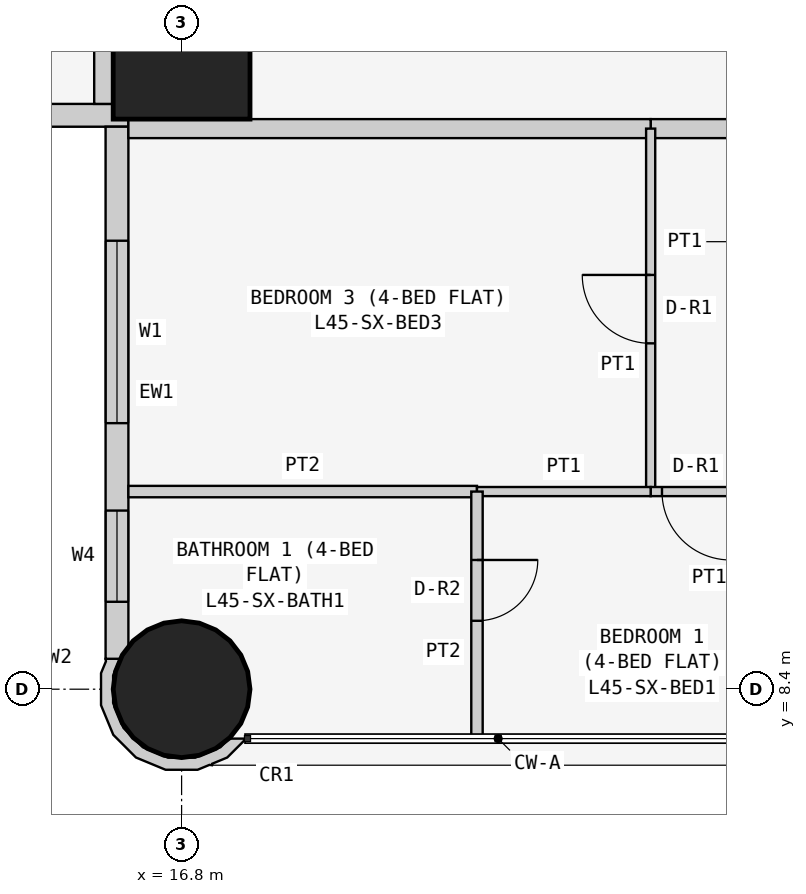
"""IFC4 building model, lengths in metres.
Left out: names, types, materials, properties, quantities, classifications, styles, units other than length and angle.
Written with IfcOpenShell. Run it as: python <this file> out.ifc"""

import sys

from ifc_helpers import new_model, si_unit, direction, frame, frame_2d, origin, origin_2d, place, context, subcontext, project, spatial, polyline, rectangle, circle, outline, extrude, element, fill, save


model = new_model("IFC4")
c1 = context("Model", 3, precision=1e-05, world=origin(), true_north=direction((0.0, 1.0)))
c2 = subcontext(c1, "Body", "Model", "MODEL_VIEW")
j1 = project(units=[si_unit("LENGTHUNIT", "METRE"), si_unit("PLANEANGLEUNIT", "RADIAN")], contexts=[c1])
p1 = place(None, origin())
s1 = spatial("IfcSite", under=j1, at=p1, CompositionType="ELEMENT")
p2 = place(p1, origin())
s2 = spatial("IfcBuilding", under=s1, at=p2, CompositionType="ELEMENT")
p3 = place(p2, frame((0.0, 0.0, 173.7)))
s3 = spatial("IfcBuildingStorey", under=s2, at=p3, CompositionType="ELEMENT", Elevation=173.7)
p4 = place(p3, frame((16.8, 8.4, 0.0), z_axis=(0.0, 0.0, 1.0), x_axis=(1.0, 0.0, 0.0)))
e1 = element("IfcColumn", 1, at=p4, inside=s3, PredefinedType="COLUMN", context=c2, shape_type="SweptSolid", body=[
    extrude(circle(Radius=0.9, at=origin_2d()), origin(), (0.0, 0.0, 1.0), 3.6),
])
p5 = place(p3, frame((16.8, 16.8, 0.0), z_axis=(0.0, 0.0, 1.0), x_axis=(1.0, 0.0, 0.0)))
e2 = element("IfcColumn", 2, at=p5, inside=s3, PredefinedType="COLUMN", context=c2, shape_type="SweptSolid", body=[
    extrude(rectangle(XDim=1.8, YDim=1.8, at=origin_2d()), origin(), (0.0, 0.0, 1.0), 3.6),
])
p6 = place(p3, frame((0.4, 15.95, 0.0), z_axis=(0.0, 0.0, 1.0), x_axis=(1.0, 0.0, 0.0)))
e3 = element("IfcWall", 3, at=p6, inside=s3, PredefinedType="SOLIDWALL", context=c2, shape_type="SweptSolid", body=[
    extrude(rectangle(XDim=15.7, YDim=0.3, at=frame_2d((7.85, 0.0))), origin(), (0.0, 0.0, 1.0), 3.35),
])
p7 = place(p6, frame((12.4, 0.0, 0.9)))
e4 = element("IfcOpeningElement", 4, at=p7, cuts=e3, PredefinedType="OPENING", context=c2, shape_type="SweptSolid", body=[
    extrude(rectangle(XDim=1.8, YDim=1.5, at=frame_2d((0.9, 0.75))), frame((0.0, 0.16, 0.0), z_axis=(0.0, -1.0, 0.0), x_axis=(1.0, 0.0, 0.0)), (0.0, 0.0, 1.0), 0.32),
])
p8 = place(p6, frame((9.55, 0.0, 1.5)))
e5 = element("IfcOpeningElement", 5, at=p8, cuts=e3, PredefinedType="OPENING", context=c2, shape_type="SweptSolid", body=[
    extrude(rectangle(XDim=0.9, YDim=0.7, at=frame_2d((0.45, 0.35))), frame((0.0, 0.16, 0.0), z_axis=(0.0, -1.0, 0.0), x_axis=(1.0, 0.0, 0.0)), (0.0, 0.0, 1.0), 0.32),
])
p9 = place(p6, frame((5.1, 0.0, 0.9)))
e6 = element("IfcOpeningElement", 6, at=p9, cuts=e3, PredefinedType="OPENING", context=c2, shape_type="SweptSolid", body=[
    extrude(rectangle(XDim=1.8, YDim=1.5, at=frame_2d((0.9, 0.75))), frame((0.0, 0.16, 0.0), z_axis=(0.0, -1.0, 0.0), x_axis=(1.0, 0.0, 0.0)), (0.0, 0.0, 1.0), 0.32),
])
p10 = place(p6, frame((2.0, 0.0, 0.0)))
e7 = element("IfcOpeningElement", 7, at=p10, cuts=e3, PredefinedType="OPENING", context=c2, shape_type="SweptSolid", body=[
    extrude(rectangle(XDim=0.9, YDim=2.4, at=frame_2d((0.45, 1.2))), frame((0.0, 0.16, 0.0), z_axis=(0.0, -1.0, 0.0), x_axis=(1.0, 0.0, 0.0)), (0.0, 0.0, 1.0), 0.32),
])
p11 = place(p6, frame((0.7, 0.0, 0.9)))
e8 = element("IfcOpeningElement", 8, at=p11, cuts=e3, PredefinedType="OPENING", context=c2, shape_type="SweptSolid", body=[
    extrude(rectangle(XDim=1.2, YDim=1.5, at=frame_2d((0.6, 0.75))), frame((0.0, 0.16, 0.0), z_axis=(0.0, -1.0, 0.0), x_axis=(1.0, 0.0, 0.0)), (0.0, 0.0, 1.0), 0.32),
])
p12 = place(p3, frame((15.95, 15.8, 0.0), z_axis=(0.0, 0.0, 1.0), x_axis=(0.0, -1.0, 0.0)))
e9 = element("IfcWall", 9, at=p12, inside=s3, PredefinedType="SOLIDWALL", context=c2, shape_type="SweptSolid", body=[
    extrude(rectangle(XDim=7.0, YDim=0.3, at=frame_2d((3.5, 0.0))), origin(), (0.0, 0.0, 1.0), 3.35),
])
p13 = place(p12, frame((1.5, 0.0, 0.9)))
e10 = element("IfcOpeningElement", 10, at=p13, cuts=e9, PredefinedType="OPENING", context=c2, shape_type="SweptSolid", body=[
    extrude(rectangle(XDim=2.4, YDim=1.5, at=frame_2d((1.2, 0.75))), frame((0.0, 0.16, 0.0), z_axis=(0.0, -1.0, 0.0), x_axis=(1.0, 0.0, 0.0)), (0.0, 0.0, 1.0), 0.32),
])
p14 = place(p12, frame((5.05, 0.0, 0.9)))
e11 = element("IfcOpeningElement", 11, at=p14, cuts=e9, PredefinedType="OPENING", context=c2, shape_type="SweptSolid", body=[
    extrude(rectangle(XDim=1.2, YDim=1.5, at=frame_2d((0.6, 0.75))), frame((0.0, 0.16, 0.0), z_axis=(0.0, -1.0, 0.0), x_axis=(1.0, 0.0, 0.0)), (0.0, 0.0, 1.0), 0.32),
])
p15 = place(p3, frame((15.89, 8.764, 0.0), z_axis=(0.0, 0.0, 1.0), x_axis=(-0.377204953059, -0.926129809145, 0.0)))
e12 = element("IfcWall", 12, at=p15, inside=s3, PredefinedType="SOLIDWALL", context=c2, shape_type="SweptSolid", body=[
    extrude(outline(polyline([(0.36, 1.803), (0.509, 1.741), (0.761, 1.486), (0.896, 1.154), (0.894, 0.795), (0.755, 0.465), (0.5, 0.213), (0.168, 0.078), (-0.1, 0.08), (0.001, -0.097), (0.03, -0.08), (0.198, -0.081), (0.589, 0.078), (0.889, 0.374), (1.052, 0.763), (1.055, 1.184), (0.896, 1.575), (0.778, 1.695), (0.769, 1.728), (0.75, 1.723), (0.6, 1.875), (0.295, 2.004), (0.281, 1.998), (0.36, 1.803)])), origin(), (0.0, 0.0, 1.0), 3.35),
])
p16 = place(p3, frame((24.171, 15.775, 0.0), z_axis=(0.0, 0.0, 1.0), x_axis=(-1.0, 0.0, 0.0)))
e13 = element("IfcWall", 13, at=p16, inside=s3, PredefinedType="PARTITIONING", context=c2, shape_type="SweptSolid", body=[
    extrude(rectangle(XDim=1.2, YDim=0.25, at=frame_2d((0.6, 0.0))), origin(), (0.0, 0.0, 1.0), 3.35),
])
for number, where, z_axis, x_axis in (
    (14, (22.971, 15.775, 0.0), (0.0, 0.0, 1.0), (-1.0, 0.0, 0.0)),
    (15, (15.775, 16.1, 0.0), (0.0, 0.0, 1.0), (0.0, 1.0, 0.0)),
):
    element("IfcWall", number, at=place(p3, frame(where, z_axis=z_axis, x_axis=x_axis)), inside=s3, PredefinedType="PARTITIONING", context=c2, shape_type="SweptSolid", body=[
        extrude(rectangle(XDim=6.871, YDim=0.25, at=frame_2d((3.436, 0.0))), origin(), (0.0, 0.0, 1.0), 3.35),
    ])
p17 = place(p3, frame((22.971, 11.0, 0.0), z_axis=(0.0, 0.0, 1.0), x_axis=(0.0, 1.0, 0.0)))
e16 = element("IfcWall", 16, at=p17, inside=s3, PredefinedType="PARTITIONING", context=c2, shape_type="SweptSolid", body=[
    extrude(rectangle(XDim=4.775, YDim=0.12, at=frame_2d((2.387, 0.0))), origin(), (0.0, 0.0, 1.0), 3.35),
])
p18 = place(p17, frame((1.95, 0.0, 0.0)))
e17 = element("IfcOpeningElement", 17, at=p18, cuts=e16, PredefinedType="OPENING", context=c2, shape_type="SweptSolid", body=[
    extrude(rectangle(XDim=0.9, YDim=2.1, at=frame_2d((0.45, 1.05))), frame((0.0, 0.07, 0.0), z_axis=(0.0, -1.0, 0.0), x_axis=(1.0, 0.0, 0.0)), (0.0, 0.0, 1.0), 0.14),
])
p19 = place(p3, frame((24.171, 11.0, 0.0), z_axis=(0.0, 0.0, 1.0), x_axis=(-1.0, 0.0, 0.0)))
e18 = element("IfcWall", 18, at=p19, inside=s3, PredefinedType="PARTITIONING", context=c2, shape_type="SweptSolid", body=[
    extrude(rectangle(XDim=1.2, YDim=0.12, at=frame_2d((0.6, 0.0))), origin(), (0.0, 0.0, 1.0), 3.35),
])
p20 = place(p19, frame((0.151, 0.0, 0.0)))
e19 = element("IfcOpeningElement", 19, at=p20, cuts=e18, PredefinedType="OPENING", context=c2, shape_type="SweptSolid", body=[
    extrude(rectangle(XDim=0.9, YDim=2.1, at=frame_2d((0.45, 1.05))), frame((0.0, 0.07, 0.0), z_axis=(0.0, -1.0, 0.0), x_axis=(1.0, 0.0, 0.0)), (0.0, 0.0, 1.0), 0.14),
])
p21 = place(p3, frame((16.1, 11.0, 0.0), z_axis=(0.0, 0.0, 1.0), x_axis=(1.0, 0.0, 0.0)))
e20 = element("IfcWall", 20, at=p21, inside=s3, PredefinedType="PARTITIONING", context=c2, shape_type="SweptSolid", body=[
    extrude(rectangle(XDim=4.586, YDim=0.15, at=frame_2d((2.293, 0.0))), origin(), (0.0, 0.0, 1.0), 3.35),
])
p22 = place(p3, frame((20.686, 11.0, 0.0), z_axis=(0.0, 0.0, 1.0), x_axis=(1.0, 0.0, 0.0)))
e21 = element("IfcWall", 21, at=p22, inside=s3, PredefinedType="PARTITIONING", context=c2, shape_type="SweptSolid", body=[
    extrude(rectangle(XDim=2.285, YDim=0.12, at=frame_2d((1.143, 0.0))), origin(), (0.0, 0.0, 1.0), 3.35),
])
p23 = place(p3, frame((20.686, 7.75, 0.0), z_axis=(0.0, 0.0, 1.0), x_axis=(0.0, 1.0, 0.0)))
e22 = element("IfcWall", 22, at=p23, inside=s3, PredefinedType="PARTITIONING", context=c2, shape_type="SweptSolid", body=[
    extrude(rectangle(XDim=3.25, YDim=0.15, at=frame_2d((1.625, 0.0))), origin(), (0.0, 0.0, 1.0), 3.35),
])
p24 = place(p23, frame((1.55, 0.0, 0.0)))
e23 = element("IfcOpeningElement", 23, at=p24, cuts=e22, PredefinedType="OPENING", context=c2, shape_type="SweptSolid", body=[
    extrude(rectangle(XDim=0.8, YDim=2.1, at=frame_2d((0.4, 1.05))), frame((0.0, 0.085, 0.0), z_axis=(0.0, -1.0, 0.0), x_axis=(1.0, 0.0, 0.0)), (0.0, 0.0, 1.0), 0.17),
])
p25 = place(p13, origin())
e24 = element("IfcWindow", 24, at=p25, inside=s3, PartitioningType="SINGLE_PANEL", PredefinedType="WINDOW", context=c2, shape_type="SweptSolid", body=[
    extrude(rectangle(XDim=2.4, YDim=1.5, at=frame_2d((1.2, 0.75))), frame((0.0, 0.03, 0.0), z_axis=(0.0, -1.0, 0.0), x_axis=(1.0, 0.0, 0.0)), (0.0, 0.0, 1.0), 0.06),
])
fill(e10, e24)
p26 = place(p14, origin())
e25 = element("IfcWindow", 25, at=p26, inside=s3, PartitioningType="SINGLE_PANEL", PredefinedType="WINDOW", context=c2, shape_type="SweptSolid", body=[
    extrude(rectangle(XDim=1.2, YDim=1.5, at=frame_2d((0.6, 0.75))), frame((0.0, 0.03, 0.0), z_axis=(0.0, -1.0, 0.0), x_axis=(1.0, 0.0, 0.0)), (0.0, 0.0, 1.0), 0.06),
])
fill(e11, e25)
p27 = place(p18, origin())
e26 = element("IfcDoor", 26, at=p27, inside=s3, OperationType="SINGLE_SWING_RIGHT", PredefinedType="DOOR", context=c2, shape_type="SweptSolid", body=[
    extrude(rectangle(XDim=0.9, YDim=2.1, at=frame_2d((0.45, 1.05))), frame((0.0, 0.025, 0.0), z_axis=(0.0, -1.0, 0.0), x_axis=(1.0, 0.0, 0.0)), (0.0, 0.0, 1.0), 0.05),
])
fill(e17, e26)
p28 = place(p20, origin())
e27 = element("IfcDoor", 27, at=p28, inside=s3, OperationType="SINGLE_SWING_LEFT", PredefinedType="DOOR", context=c2, shape_type="SweptSolid", body=[
    extrude(rectangle(XDim=0.9, YDim=2.1, at=frame_2d((0.45, 1.05))), frame((0.0, 0.025, 0.0), z_axis=(0.0, -1.0, 0.0), x_axis=(1.0, 0.0, 0.0)), (0.0, 0.0, 1.0), 0.05),
])
fill(e19, e27)
p29 = place(p24, frame((0.8, 0.0, 0.0), z_axis=(0.0, 0.0, 1.0), x_axis=(-1.0, 0.0, 0.0)))
e28 = element("IfcDoor", 28, at=p29, inside=s3, OperationType="SINGLE_SWING_LEFT", PredefinedType="DOOR", context=c2, shape_type="SweptSolid", body=[
    extrude(rectangle(XDim=0.8, YDim=2.1, at=frame_2d((0.4, 1.05))), frame((0.0, 0.025, 0.0), z_axis=(0.0, -1.0, 0.0), x_axis=(1.0, 0.0, 0.0)), (0.0, 0.0, 1.0), 0.05),
])
fill(e23, e28)
save(model, sys.argv[1])
